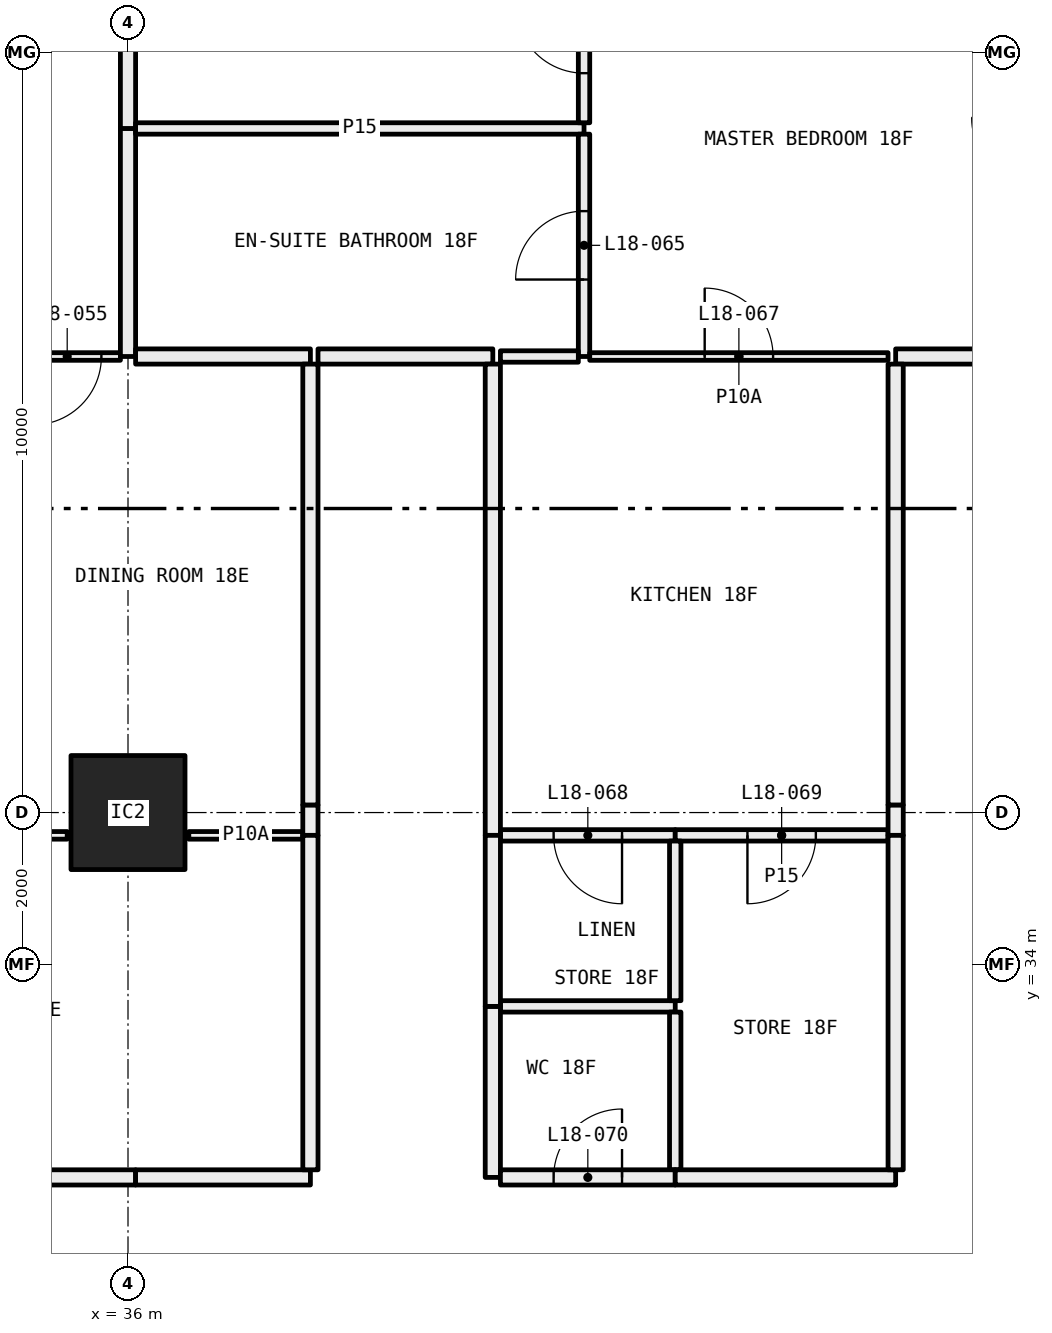
"""IFC4 building model, lengths in metres.
Left out: names, types, materials, properties, quantities, classifications, styles, units other than length and angle.
Written with IfcOpenShell. Run it as: python <this file> out.ifc"""

import sys

from ifc_helpers import new_model, si_unit, direction, frame, frame_2d, origin, origin_2d, place, context, subcontext, project, spatial, rectangle, hollow_rectangle, extrude, element, fill, save


model = new_model("IFC4")
c1 = context("Model", 3, precision=1e-05, world=origin(), true_north=direction((0.0, 1.0)))
c2 = subcontext(c1, "Body", "Model", "MODEL_VIEW")
j1 = project(units=[si_unit("LENGTHUNIT", "METRE"), si_unit("PLANEANGLEUNIT", "RADIAN")], contexts=[c1])
p1 = place(None, origin())
s1 = spatial("IfcSite", under=j1, at=p1, CompositionType="ELEMENT")
p2 = place(p1, origin())
s2 = spatial("IfcBuilding", under=s1, at=p2, CompositionType="ELEMENT")
p3 = place(p2, frame((0.0, 0.0, 74.85)))
s3 = spatial("IfcBuildingStorey", under=s2, at=p3, CompositionType="ELEMENT", Elevation=74.85)
p4 = place(p3, frame((36.0, 36.0, 0.0), z_axis=(0.0, 0.0, 1.0), x_axis=(1.0, 0.0, 0.0)))
e1 = element("IfcColumn", 1, at=p4, inside=s3, PredefinedType="COLUMN", context=c2, shape_type="SweptSolid", body=[
    extrude(hollow_rectangle(XDim=1.5, YDim=1.5, WallThickness=0.065, at=origin_2d()), origin(), (0.0, 0.0, 1.0), 3.05),
])
p5 = place(p3, frame((34.5, 42.0, 0.0), z_axis=(0.0, 0.0, 1.0), x_axis=(1.0, 0.0, 0.0)))
e2 = element("IfcWall", 2, at=p5, inside=s3, PredefinedType="PARTITIONING", context=c2, shape_type="SweptSolid", body=[
    extrude(rectangle(XDim=1.4, YDim=0.1, at=frame_2d((0.7, 0.0))), origin(), (0.0, 0.0, 1.0), 3.05),
])
p6 = place(p5, frame((0.25, 0.0, 0.0)))
e3 = element("IfcOpeningElement", 3, at=p6, cuts=e2, PredefinedType="OPENING", context=c2, shape_type="SweptSolid", body=[
    extrude(rectangle(XDim=0.9, YDim=2.1, at=frame_2d((0.45, 1.05))), frame((0.0, 0.06, 0.0), z_axis=(0.0, -1.0, 0.0), x_axis=(1.0, 0.0, 0.0)), (0.0, 0.0, 1.0), 0.12),
])
p7 = place(p3, frame((36.0, 42.0, 0.0), z_axis=(0.0, 0.0, 1.0), x_axis=(0.0, 1.0, 0.0)))
e4 = element("IfcWall", 4, at=p7, inside=s3, PredefinedType="PARTITIONING", context=c2, shape_type="SweptSolid", body=[
    extrude(rectangle(XDim=3.0, YDim=0.2, at=frame_2d((1.5, 0.0))), origin(), (0.0, 0.0, 1.0), 2.45),
])
p8 = place(p3, frame((36.0, 45.0, 0.0), z_axis=(0.0, 0.0, 1.0), x_axis=(0.0, 1.0, 0.0)))
e5 = element("IfcWall", 5, at=p8, inside=s3, PredefinedType="PARTITIONING", context=c2, shape_type="SweptSolid", body=[
    extrude(rectangle(XDim=2.28, YDim=0.2, at=frame_2d((1.14, 0.0))), origin(), (0.0, 0.0, 1.0), 2.45),
])
p9 = place(p3, frame((34.55, 35.7, 0.0), z_axis=(0.0, 0.0, 1.0), x_axis=(1.0, 0.0, 0.0)))
e6 = element("IfcWall", 6, at=p9, inside=s3, PredefinedType="PARTITIONING", context=c2, shape_type="SweptSolid", body=[
    extrude(rectangle(XDim=0.65, YDim=0.1, at=frame_2d((0.325, 0.0))), origin(), (0.0, 0.0, 1.0), 3.05),
])
p10 = place(p3, frame((36.8, 35.7, 0.0), z_axis=(0.0, 0.0, 1.0), x_axis=(1.0, 0.0, 0.0)))
e7 = element("IfcWall", 7, at=p10, inside=s3, PredefinedType="PARTITIONING", context=c2, shape_type="SweptSolid", body=[
    extrude(rectangle(XDim=1.5, YDim=0.1, at=frame_2d((0.75, 0.0))), origin(), (0.0, 0.0, 1.0), 3.05),
])
p11 = place(p3, frame((38.4, 42.0, 0.0), z_axis=(0.0, 0.0, 1.0), x_axis=(-1.0, 0.0, 0.0)))
e8 = element("IfcWall", 8, at=p11, inside=s3, PredefinedType="PARTITIONING", context=c2, shape_type="SweptSolid", body=[
    extrude(rectangle(XDim=2.3, YDim=0.2, at=frame_2d((1.15, 0.0))), origin(), (0.0, 0.0, 1.0), 3.05),
])
p12 = place(p3, frame((38.4, 35.7, 0.0), z_axis=(0.0, 0.0, 1.0), x_axis=(0.0, 1.0, 0.0)))
e9 = element("IfcWall", 9, at=p12, inside=s3, PredefinedType="PARTITIONING", context=c2, shape_type="SweptSolid", body=[
    extrude(rectangle(XDim=0.4, YDim=0.2, at=frame_2d((0.2, 0.0))), origin(), (0.0, 0.0, 1.0), 2.45),
])
p13 = place(p3, frame((38.4, 36.1, 0.0), z_axis=(0.0, 0.0, 1.0), x_axis=(0.0, 1.0, 0.0)))
e10 = element("IfcWall", 10, at=p13, inside=s3, PredefinedType="PARTITIONING", context=c2, shape_type="SweptSolid", body=[
    extrude(rectangle(XDim=5.8, YDim=0.2, at=frame_2d((2.9, 0.0))), origin(), (0.0, 0.0, 1.0), 3.05),
])
p14 = place(p3, frame((30.0, 31.2, 0.0), z_axis=(0.0, 0.0, 1.0), x_axis=(1.0, 0.0, 0.0)))
e11 = element("IfcWall", 11, at=p14, inside=s3, PredefinedType="PARTITIONING", context=c2, shape_type="SweptSolid", body=[
    extrude(rectangle(XDim=6.1, YDim=0.2, at=frame_2d((3.05, 0.0))), origin(), (0.0, 0.0, 1.0), 2.45),
])
p15 = place(p3, frame((36.1, 31.2, 0.0), z_axis=(0.0, 0.0, 1.0), x_axis=(1.0, 0.0, 0.0)))
e12 = element("IfcWall", 12, at=p15, inside=s3, PredefinedType="PARTITIONING", context=c2, shape_type="SweptSolid", body=[
    extrude(rectangle(XDim=2.3, YDim=0.2, at=frame_2d((1.15, 0.0))), origin(), (0.0, 0.0, 1.0), 3.05),
])
p16 = place(p3, frame((38.4, 31.3, 0.0), z_axis=(0.0, 0.0, 1.0), x_axis=(0.0, 1.0, 0.0)))
e13 = element("IfcWall", 13, at=p16, inside=s3, PredefinedType="PARTITIONING", context=c2, shape_type="SweptSolid", body=[
    extrude(rectangle(XDim=4.4, YDim=0.2, at=frame_2d((2.2, 0.0))), origin(), (0.0, 0.0, 1.0), 3.05),
])
p17 = place(p3, frame((42.0, 45.0, 0.0), z_axis=(0.0, 0.0, 1.0), x_axis=(-1.0, 0.0, 0.0)))
e14 = element("IfcWall", 14, at=p17, inside=s3, PredefinedType="PARTITIONING", context=c2, shape_type="SweptSolid", body=[
    extrude(rectangle(XDim=5.9, YDim=0.15, at=frame_2d((2.95, 0.0))), origin(), (0.0, 0.0, 1.0), 3.05),
])
p18 = place(p3, frame((42.0, 42.0, 0.0), z_axis=(0.0, 0.0, 1.0), x_axis=(0.0, 1.0, 0.0)))
e15 = element("IfcWall", 15, at=p18, inside=s3, PredefinedType="PARTITIONING", context=c2, shape_type="SweptSolid", body=[
    extrude(rectangle(XDim=2.925, YDim=0.15, at=frame_2d((1.462, 0.0))), origin(), (0.0, 0.0, 1.0), 3.05),
])
p19 = place(p18, frame((1.012, 0.0, 0.0)))
e16 = element("IfcOpeningElement", 16, at=p19, cuts=e15, PredefinedType="OPENING", context=c2, shape_type="SweptSolid", body=[
    extrude(rectangle(XDim=0.9, YDim=2.1, at=frame_2d((0.45, 1.05))), frame((0.0, 0.085, 0.0), z_axis=(0.0, -1.0, 0.0), x_axis=(1.0, 0.0, 0.0)), (0.0, 0.0, 1.0), 0.17),
])
p20 = place(p3, frame((40.9, 42.0, 0.0), z_axis=(0.0, 0.0, 1.0), x_axis=(1.0, 0.0, 0.0)))
e17 = element("IfcWall", 17, at=p20, inside=s3, PredefinedType="PARTITIONING", context=c2, shape_type="SweptSolid", body=[
    extrude(rectangle(XDim=1.025, YDim=0.15, at=frame_2d((0.513, 0.0))), origin(), (0.0, 0.0, 1.0), 3.05),
])
p21 = place(p3, frame((38.5, 42.0, 0.0), z_axis=(0.0, 0.0, 1.0), x_axis=(1.0, 0.0, 0.0)))
e18 = element("IfcWall", 18, at=p21, inside=s3, PredefinedType="PARTITIONING", context=c2, shape_type="SweptSolid", body=[
    extrude(rectangle(XDim=2.3, YDim=0.2, at=frame_2d((1.15, 0.0))), origin(), (0.0, 0.0, 1.0), 3.05),
])
p22 = place(p3, frame((42.0, 45.075, 0.0), z_axis=(0.0, 0.0, 1.0), x_axis=(0.0, 1.0, 0.0)))
e19 = element("IfcWall", 19, at=p22, inside=s3, PredefinedType="PARTITIONING", context=c2, shape_type="SweptSolid", body=[
    extrude(rectangle(XDim=2.205, YDim=0.15, at=frame_2d((1.103, 0.0))), origin(), (0.0, 0.0, 1.0), 3.05),
])
p23 = place(p22, frame((0.653, 0.0, 0.0)))
e20 = element("IfcOpeningElement", 20, at=p23, cuts=e19, PredefinedType="OPENING", context=c2, shape_type="SweptSolid", body=[
    extrude(rectangle(XDim=0.9, YDim=2.1, at=frame_2d((0.45, 1.05))), frame((0.0, 0.085, 0.0), z_axis=(0.0, -1.0, 0.0), x_axis=(1.0, 0.0, 0.0)), (0.0, 0.0, 1.0), 0.17),
])
p24 = place(p3, frame((42.075, 42.0, 0.0), z_axis=(0.0, 0.0, 1.0), x_axis=(1.0, 0.0, 0.0)))
e21 = element("IfcWall", 21, at=p24, inside=s3, PredefinedType="PARTITIONING", context=c2, shape_type="SweptSolid", body=[
    extrude(rectangle(XDim=3.925, YDim=0.1, at=frame_2d((1.962, 0.0))), origin(), (0.0, 0.0, 1.0), 3.05),
])
p25 = place(p24, frame((1.512, 0.0, 0.0)))
e22 = element("IfcOpeningElement", 22, at=p25, cuts=e21, PredefinedType="OPENING", context=c2, shape_type="SweptSolid", body=[
    extrude(rectangle(XDim=0.9, YDim=2.1, at=frame_2d((0.45, 1.05))), frame((0.0, 0.06, 0.0), z_axis=(0.0, -1.0, 0.0), x_axis=(1.0, 0.0, 0.0)), (0.0, 0.0, 1.0), 0.12),
])
p26 = place(p3, frame((46.1, 42.0, 0.0), z_axis=(0.0, 0.0, 1.0), x_axis=(1.0, 0.0, 0.0)))
e23 = element("IfcWall", 23, at=p26, inside=s3, PredefinedType="PARTITIONING", context=c2, shape_type="SweptSolid", body=[
    extrude(rectangle(XDim=1.9, YDim=0.2, at=frame_2d((0.95, 0.0))), origin(), (0.0, 0.0, 1.0), 3.05),
])
p27 = place(p3, frame((40.9, 35.7, 0.0), z_axis=(0.0, 0.0, 1.0), x_axis=(1.0, 0.0, 0.0)))
e24 = element("IfcWall", 24, at=p27, inside=s3, PredefinedType="PARTITIONING", context=c2, shape_type="SweptSolid", body=[
    extrude(rectangle(XDim=2.3, YDim=0.15, at=frame_2d((1.15, 0.0))), origin(), (0.0, 0.0, 1.0), 3.05),
])
p28 = place(p27, frame((0.7, 0.0, 0.0)))
e25 = element("IfcOpeningElement", 25, at=p28, cuts=e24, PredefinedType="OPENING", context=c2, shape_type="SweptSolid", body=[
    extrude(rectangle(XDim=0.9, YDim=2.1, at=frame_2d((0.45, 1.05))), frame((0.0, 0.085, 0.0), z_axis=(0.0, -1.0, 0.0), x_axis=(1.0, 0.0, 0.0)), (0.0, 0.0, 1.0), 0.17),
])
p29 = place(p3, frame((43.2, 35.7, 0.0), z_axis=(0.0, 0.0, 1.0), x_axis=(1.0, 0.0, 0.0)))
e26 = element("IfcWall", 26, at=p29, inside=s3, PredefinedType="PARTITIONING", context=c2, shape_type="SweptSolid", body=[
    extrude(rectangle(XDim=2.8, YDim=0.15, at=frame_2d((1.4, 0.0))), origin(), (0.0, 0.0, 1.0), 3.05),
])
p30 = place(p29, frame((0.95, 0.0, 0.0)))
e27 = element("IfcOpeningElement", 27, at=p30, cuts=e26, PredefinedType="OPENING", context=c2, shape_type="SweptSolid", body=[
    extrude(rectangle(XDim=0.9, YDim=2.1, at=frame_2d((0.45, 1.05))), frame((0.0, 0.085, 0.0), z_axis=(0.0, -1.0, 0.0), x_axis=(1.0, 0.0, 0.0)), (0.0, 0.0, 1.0), 0.17),
])
p31 = place(p3, frame((40.8, 41.9, 0.0), z_axis=(0.0, 0.0, 1.0), x_axis=(0.0, -1.0, 0.0)))
e28 = element("IfcWall", 28, at=p31, inside=s3, PredefinedType="PARTITIONING", context=c2, shape_type="SweptSolid", body=[
    extrude(rectangle(XDim=6.2, YDim=0.2, at=frame_2d((3.1, 0.0))), origin(), (0.0, 0.0, 1.0), 2.45),
])
p32 = place(p3, frame((46.1, 35.7, 0.0), z_axis=(0.0, 0.0, 1.0), x_axis=(0.0, 1.0, 0.0)))
e29 = element("IfcWall", 29, at=p32, inside=s3, PredefinedType="PARTITIONING", context=c2, shape_type="SweptSolid", body=[
    extrude(rectangle(XDim=0.4, YDim=0.2, at=frame_2d((0.2, 0.0))), origin(), (0.0, 0.0, 1.0), 2.45),
])
p33 = place(p3, frame((46.1, 36.1, 0.0), z_axis=(0.0, 0.0, 1.0), x_axis=(0.0, 1.0, 0.0)))
e30 = element("IfcWall", 30, at=p33, inside=s3, PredefinedType="PARTITIONING", context=c2, shape_type="SweptSolid", body=[
    extrude(rectangle(XDim=5.8, YDim=0.2, at=frame_2d((2.9, 0.0))), origin(), (0.0, 0.0, 1.0), 3.05),
])
p34 = place(p3, frame((43.2, 33.45, 0.0), z_axis=(0.0, 0.0, 1.0), x_axis=(-1.0, 0.0, 0.0)))
e31 = element("IfcWall", 31, at=p34, inside=s3, PredefinedType="PARTITIONING", context=c2, shape_type="SweptSolid", body=[
    extrude(rectangle(XDim=2.3, YDim=0.15, at=frame_2d((1.15, 0.0))), origin(), (0.0, 0.0, 1.0), 3.05),
])
p35 = place(p3, frame((43.2, 31.3, 0.0), z_axis=(0.0, 0.0, 1.0), x_axis=(0.0, 1.0, 0.0)))
e32 = element("IfcWall", 32, at=p35, inside=s3, PredefinedType="PARTITIONING", context=c2, shape_type="SweptSolid", body=[
    extrude(rectangle(XDim=2.075, YDim=0.15, at=frame_2d((1.038, 0.0))), origin(), (0.0, 0.0, 1.0), 3.05),
])
p36 = place(p3, frame((40.8, 33.45, 0.0), z_axis=(0.0, 0.0, 1.0), x_axis=(0.0, -1.0, 0.0)))
e33 = element("IfcWall", 33, at=p36, inside=s3, PredefinedType="PARTITIONING", context=c2, shape_type="SweptSolid", body=[
    extrude(rectangle(XDim=2.25, YDim=0.2, at=frame_2d((1.125, 0.0))), origin(), (0.0, 0.0, 1.0), 3.05),
])
p37 = place(p3, frame((40.9, 31.2, 0.0), z_axis=(0.0, 0.0, 1.0), x_axis=(1.0, 0.0, 0.0)))
e34 = element("IfcWall", 34, at=p37, inside=s3, PredefinedType="PARTITIONING", context=c2, shape_type="SweptSolid", body=[
    extrude(rectangle(XDim=2.3, YDim=0.2, at=frame_2d((1.15, 0.0))), origin(), (0.0, 0.0, 1.0), 3.05),
])
p38 = place(p37, frame((0.7, 0.0, 0.0)))
e35 = element("IfcOpeningElement", 35, at=p38, cuts=e34, PredefinedType="OPENING", context=c2, shape_type="SweptSolid", body=[
    extrude(rectangle(XDim=0.9, YDim=2.1, at=frame_2d((0.45, 1.05))), frame((0.0, 0.11, 0.0), z_axis=(0.0, -1.0, 0.0), x_axis=(1.0, 0.0, 0.0)), (0.0, 0.0, 1.0), 0.22),
])
p39 = place(p3, frame((43.2, 33.525, 0.0), z_axis=(0.0, 0.0, 1.0), x_axis=(0.0, 1.0, 0.0)))
e36 = element("IfcWall", 36, at=p39, inside=s3, PredefinedType="PARTITIONING", context=c2, shape_type="SweptSolid", body=[
    extrude(rectangle(XDim=2.1, YDim=0.15, at=frame_2d((1.05, 0.0))), origin(), (0.0, 0.0, 1.0), 3.05),
])
p40 = place(p3, frame((40.8, 35.7, 0.0), z_axis=(0.0, 0.0, 1.0), x_axis=(0.0, -1.0, 0.0)))
e37 = element("IfcWall", 37, at=p40, inside=s3, PredefinedType="PARTITIONING", context=c2, shape_type="SweptSolid", body=[
    extrude(rectangle(XDim=2.25, YDim=0.2, at=frame_2d((1.125, 0.0))), origin(), (0.0, 0.0, 1.0), 3.05),
])
p41 = place(p3, frame((43.2, 31.2, 0.0), z_axis=(0.0, 0.0, 1.0), x_axis=(1.0, 0.0, 0.0)))
e38 = element("IfcWall", 38, at=p41, inside=s3, PredefinedType="PARTITIONING", context=c2, shape_type="SweptSolid", body=[
    extrude(rectangle(XDim=2.9, YDim=0.2, at=frame_2d((1.45, 0.0))), origin(), (0.0, 0.0, 1.0), 3.05),
])
p42 = place(p3, frame((46.1, 31.3, 0.0), z_axis=(0.0, 0.0, 1.0), x_axis=(0.0, 1.0, 0.0)))
e39 = element("IfcWall", 39, at=p42, inside=s3, PredefinedType="PARTITIONING", context=c2, shape_type="SweptSolid", body=[
    extrude(rectangle(XDim=4.4, YDim=0.2, at=frame_2d((2.2, 0.0))), origin(), (0.0, 0.0, 1.0), 3.05),
])
p43 = place(p6, frame((0.9, 0.0, 0.0), x_axis=(-1.0, 0.0, 0.0)))
e40 = element("IfcDoor", 40, at=p43, inside=s3, OperationType="SINGLE_SWING_LEFT", PredefinedType="DOOR", context=c2, shape_type="SweptSolid", body=[
    extrude(rectangle(XDim=0.9, YDim=2.1, at=frame_2d((0.45, 1.05))), frame((0.0, 0.025, 0.0), z_axis=(0.0, -1.0, 0.0), x_axis=(1.0, 0.0, 0.0)), (0.0, 0.0, 1.0), 0.05),
])
fill(e3, e40)
p44 = place(p19, origin())
e41 = element("IfcDoor", 41, at=p44, inside=s3, OperationType="SINGLE_SWING_RIGHT", PredefinedType="DOOR", context=c2, shape_type="SweptSolid", body=[
    extrude(rectangle(XDim=0.9, YDim=2.1, at=frame_2d((0.45, 1.05))), frame((0.0, 0.025, 0.0), z_axis=(0.0, -1.0, 0.0), x_axis=(1.0, 0.0, 0.0)), (0.0, 0.0, 1.0), 0.05),
])
fill(e16, e41)
p45 = place(p23, origin())
e42 = element("IfcDoor", 42, at=p45, inside=s3, OperationType="SINGLE_SWING_LEFT", PredefinedType="DOOR", context=c2, shape_type="SweptSolid", body=[
    extrude(rectangle(XDim=0.9, YDim=2.1, at=frame_2d((0.45, 1.05))), frame((0.0, 0.025, 0.0), z_axis=(0.0, -1.0, 0.0), x_axis=(1.0, 0.0, 0.0)), (0.0, 0.0, 1.0), 0.05),
])
fill(e20, e42)
p46 = place(p25, origin())
e43 = element("IfcDoor", 43, at=p46, inside=s3, OperationType="SINGLE_SWING_RIGHT", PredefinedType="DOOR", context=c2, shape_type="SweptSolid", body=[
    extrude(rectangle(XDim=0.9, YDim=2.1, at=frame_2d((0.45, 1.05))), frame((0.0, 0.025, 0.0), z_axis=(0.0, -1.0, 0.0), x_axis=(1.0, 0.0, 0.0)), (0.0, 0.0, 1.0), 0.05),
])
fill(e22, e43)
p47 = place(p28, frame((0.9, 0.0, 0.0), x_axis=(-1.0, 0.0, 0.0)))
e44 = element("IfcDoor", 44, at=p47, inside=s3, OperationType="SINGLE_SWING_RIGHT", PredefinedType="DOOR", context=c2, shape_type="SweptSolid", body=[
    extrude(rectangle(XDim=0.9, YDim=2.1, at=frame_2d((0.45, 1.05))), frame((0.0, 0.025, 0.0), z_axis=(0.0, -1.0, 0.0), x_axis=(1.0, 0.0, 0.0)), (0.0, 0.0, 1.0), 0.05),
])
fill(e25, e44)
p48 = place(p30, frame((0.9, 0.0, 0.0), x_axis=(-1.0, 0.0, 0.0)))
e45 = element("IfcDoor", 45, at=p48, inside=s3, OperationType="SINGLE_SWING_LEFT", PredefinedType="DOOR", context=c2, shape_type="SweptSolid", body=[
    extrude(rectangle(XDim=0.9, YDim=2.1, at=frame_2d((0.45, 1.05))), frame((0.0, 0.025, 0.0), z_axis=(0.0, -1.0, 0.0), x_axis=(1.0, 0.0, 0.0)), (0.0, 0.0, 1.0), 0.05),
])
fill(e27, e45)
p49 = place(p38, origin())
e46 = element("IfcDoor", 46, at=p49, inside=s3, OperationType="SINGLE_SWING_LEFT", PredefinedType="DOOR", context=c2, shape_type="SweptSolid", body=[
    extrude(rectangle(XDim=0.9, YDim=2.1, at=frame_2d((0.45, 1.05))), frame((0.0, 0.025, 0.0), z_axis=(0.0, -1.0, 0.0), x_axis=(1.0, 0.0, 0.0)), (0.0, 0.0, 1.0), 0.05),
])
fill(e35, e46)
save(model, sys.argv[1])
